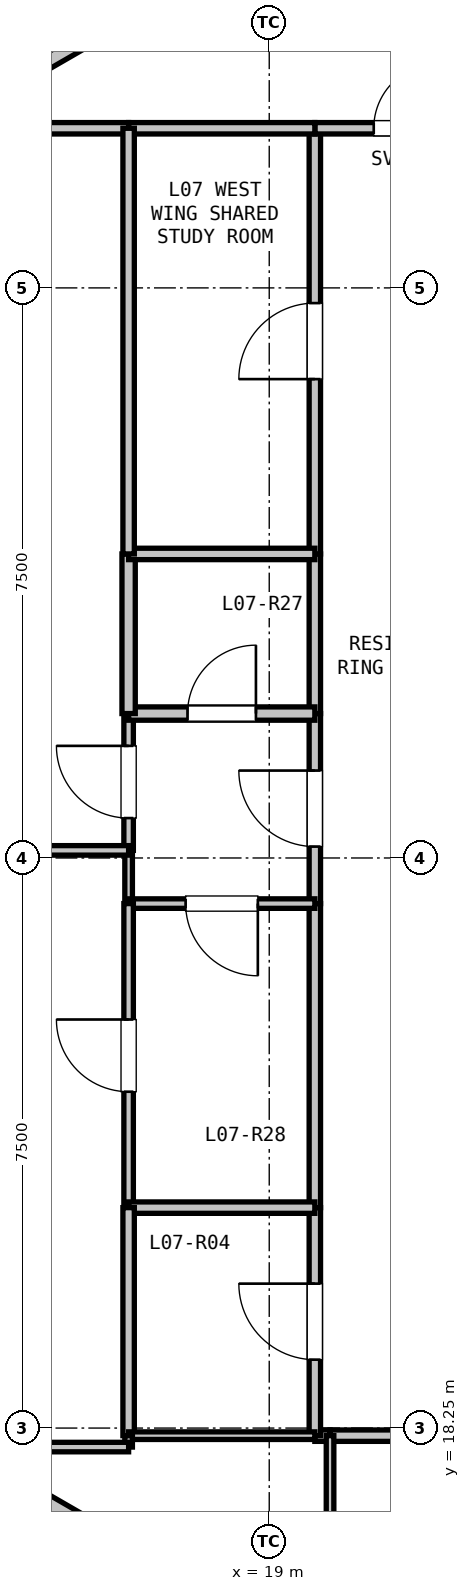
"""IFC4 building model, lengths in metres.
Left out: names, types, materials, properties, quantities, classifications, styles, units other than length and angle.
Written with IfcOpenShell. Run it as: python <this file> out.ifc"""

import sys

from ifc_helpers import new_model, si_unit, direction, frame, frame_2d, origin, place, context, subcontext, project, spatial, rectangle, extrude, element, fill, save


model = new_model("IFC4")
c1 = context("Model", 3, precision=1e-05, world=origin(), true_north=direction((0.0, 1.0)))
c2 = subcontext(c1, "Body", "Model", "MODEL_VIEW")
j1 = project(units=[si_unit("LENGTHUNIT", "METRE"), si_unit("PLANEANGLEUNIT", "RADIAN")], contexts=[c1])
p1 = place(None, origin())
s1 = spatial("IfcSite", under=j1, at=p1, CompositionType="ELEMENT")
p2 = place(p1, origin())
s2 = spatial("IfcBuilding", under=s1, at=p2, CompositionType="ELEMENT")
p3 = place(p2, frame((0.0, 0.0, 29.1)))
s3 = spatial("IfcBuildingStorey", under=s2, at=p3, CompositionType="ELEMENT", Elevation=29.1)
for number, where, z_axis, x_axis in (
    (1, (15.008, 35.611, 0.0), (0.0, 0.0, 1.0), (0.866, 0.5, 0.0)),
    (2, (16.48, 17.039, 0.0), (0.0, 0.0, 1.0), (-0.866, 0.5, 0.0)),
):
    element("IfcWall", number, at=place(p3, frame(where, z_axis=z_axis, x_axis=x_axis)), inside=s3, PredefinedType="PARAPET", context=c2, shape_type="SweptSolid", body=[
        extrude(rectangle(XDim=1.7, YDim=0.2, at=frame_2d((0.85, 0.0))), origin(), (0.0, 0.0, 1.0), 2.66),
    ])
p4 = place(p3, frame((22.6, 18.15, 0.0), z_axis=(0.0, 0.0, 1.0), x_axis=(-1.0, 0.0, 0.0)))
e3 = element("IfcWall", 3, at=p4, inside=s3, PredefinedType="PARTITIONING", context=c2, shape_type="SweptSolid", body=[
    extrude(rectangle(XDim=2.8, YDim=0.15, at=frame_2d((1.4, 0.0))), origin(), (0.0, 0.0, 1.0), 3.04),
])
p5 = place(p4, frame((0.9, 0.0, 0.0)))
e4 = element("IfcOpeningElement", 4, at=p5, cuts=e3, PredefinedType="OPENING", context=c2, shape_type="SweptSolid", body=[
    extrude(rectangle(XDim=1.0, YDim=2.15, at=frame_2d((0.5, 1.075))), frame((0.0, 0.085, 0.0), z_axis=(0.0, -1.0, 0.0), x_axis=(1.0, 0.0, 0.0)), (0.0, 0.0, 1.0), 0.17),
])
p6 = place(p3, frame((19.8, 18.15, 0.0), z_axis=(0.0, 0.0, 1.0), x_axis=(-1.0, 0.0, 0.0)))
e5 = element("IfcWall", 5, at=p6, inside=s3, PredefinedType="PARTITIONING", context=c2, shape_type="SweptSolid", body=[
    extrude(rectangle(XDim=0.2, YDim=0.15, at=frame_2d((0.1, 0.0))), origin(), (0.0, 0.0, 1.0), 3.04),
])
p7 = place(p3, frame((19.6, 18.15, 0.0), z_axis=(0.0, 0.0, 1.0), x_axis=(0.0, 1.0, 0.0)))
e6 = element("IfcWall", 6, at=p7, inside=s3, PredefinedType="PARTITIONING", context=c2, shape_type="SweptSolid", body=[
    extrude(rectangle(XDim=3.0, YDim=0.15, at=frame_2d((1.5, 0.0))), origin(), (0.0, 0.0, 1.0), 2.337),
])
p8 = place(p7, frame((1.0, 0.0, 0.0)))
e7 = element("IfcOpeningElement", 7, at=p8, cuts=e6, PredefinedType="OPENING", context=c2, shape_type="SweptSolid", body=[
    extrude(rectangle(XDim=1.0, YDim=2.15, at=frame_2d((0.5, 1.075))), frame((0.0, 0.085, 0.0), z_axis=(0.0, -1.0, 0.0), x_axis=(1.0, 0.0, 0.0)), (0.0, 0.0, 1.0), 0.17),
])
p9 = place(p3, frame((19.6, 21.15, 0.0), z_axis=(0.0, 0.0, 1.0), x_axis=(0.0, 1.0, 0.0)))
e8 = element("IfcWall", 8, at=p9, inside=s3, PredefinedType="PARTITIONING", context=c2, shape_type="SweptSolid", body=[
    extrude(rectangle(XDim=4.0, YDim=0.15, at=frame_2d((2.0, 0.0))), origin(), (0.0, 0.0, 1.0), 3.04),
])
p10 = place(p3, frame((19.6, 25.15, 0.0), z_axis=(0.0, 0.0, 1.0), x_axis=(0.0, 1.0, 0.0)))
e9 = element("IfcWall", 9, at=p10, inside=s3, PredefinedType="PARTITIONING", context=c2, shape_type="SweptSolid", body=[
    extrude(rectangle(XDim=2.5, YDim=0.15, at=frame_2d((1.25, 0.0))), origin(), (0.0, 0.0, 1.0), 3.04),
])
p11 = place(p10, frame((0.75, 0.0, 0.0)))
e10 = element("IfcOpeningElement", 10, at=p11, cuts=e9, PredefinedType="OPENING", context=c2, shape_type="SweptSolid", body=[
    extrude(rectangle(XDim=1.0, YDim=2.15, at=frame_2d((0.5, 1.075))), frame((0.0, 0.085, 0.0), z_axis=(0.0, -1.0, 0.0), x_axis=(1.0, 0.0, 0.0)), (0.0, 0.0, 1.0), 0.17),
])
p12 = place(p3, frame((19.6, 27.65, 0.0), z_axis=(0.0, 0.0, 1.0), x_axis=(0.0, 1.0, 0.0)))
e11 = element("IfcWall", 11, at=p12, inside=s3, PredefinedType="PARTITIONING", context=c2, shape_type="SweptSolid", body=[
    extrude(rectangle(XDim=2.1, YDim=0.15, at=frame_2d((1.05, 0.0))), origin(), (0.0, 0.0, 1.0), 3.04),
])
p13 = place(p3, frame((19.6, 29.75, 0.0), z_axis=(0.0, 0.0, 1.0), x_axis=(0.0, 1.0, 0.0)))
e12 = element("IfcWall", 12, at=p13, inside=s3, PredefinedType="PARTITIONING", context=c2, shape_type="SweptSolid", body=[
    extrude(rectangle(XDim=5.6, YDim=0.15, at=frame_2d((2.8, 0.0))), origin(), (0.0, 0.0, 1.0), 2.337),
])
p14 = place(p13, frame((2.3, 0.0, 0.0)))
e13 = element("IfcOpeningElement", 13, at=p14, cuts=e12, PredefinedType="OPENING", context=c2, shape_type="SweptSolid", body=[
    extrude(rectangle(XDim=1.0, YDim=2.15, at=frame_2d((0.5, 1.075))), frame((0.0, 0.085, 0.0), z_axis=(0.0, -1.0, 0.0), x_axis=(1.0, 0.0, 0.0)), (0.0, 0.0, 1.0), 0.17),
])
p15 = place(p3, frame((19.6, 35.35, 0.0), z_axis=(0.0, 0.0, 1.0), x_axis=(1.0, 0.0, 0.0)))
e14 = element("IfcWall", 14, at=p15, inside=s3, PredefinedType="PARTITIONING", context=c2, shape_type="SweptSolid", body=[
    extrude(rectangle(XDim=2.4, YDim=0.15, at=frame_2d((1.2, 0.0))), origin(), (0.0, 0.0, 1.0), 3.04),
])
p16 = place(p15, frame((0.775, 0.0, 0.0)))
e15 = element("IfcOpeningElement", 15, at=p16, cuts=e14, PredefinedType="OPENING", context=c2, shape_type="SweptSolid", body=[
    extrude(rectangle(XDim=0.85, YDim=2.1, at=frame_2d((0.425, 1.05))), frame((0.0, 0.085, 0.0), z_axis=(0.0, -1.0, 0.0), x_axis=(1.0, 0.0, 0.0)), (0.0, 0.0, 1.0), 0.17),
])
p17 = place(p3, frame((17.15, 25.15, 0.0), z_axis=(0.0, 0.0, 1.0), x_axis=(0.0, 1.0, 0.0)))
e16 = element("IfcWall", 16, at=p17, inside=s3, PredefinedType="PARTITIONING", context=c2, shape_type="SweptSolid", body=[
    extrude(rectangle(XDim=0.7, YDim=0.1, at=frame_2d((0.35, 0.0))), origin(), (0.0, 0.0, 1.0), 3.04),
])
p18 = place(p3, frame((17.15, 25.85, 0.0), z_axis=(0.0, 0.0, 1.0), x_axis=(0.0, 1.0, 0.0)))
e17 = element("IfcWall", 17, at=p18, inside=s3, PredefinedType="PARTITIONING", context=c2, shape_type="SweptSolid", body=[
    extrude(rectangle(XDim=1.8, YDim=0.125, at=frame_2d((0.9, 0.0))), origin(), (0.0, 0.0, 1.0), 3.04),
])
p19 = place(p18, frame((0.425, 0.0, 0.0)))
e18 = element("IfcOpeningElement", 18, at=p19, cuts=e17, PredefinedType="OPENING", context=c2, shape_type="SweptSolid", body=[
    extrude(rectangle(XDim=0.95, YDim=2.1, at=frame_2d((0.475, 1.05))), frame((0.0, 0.073, 0.0), z_axis=(0.0, -1.0, 0.0), x_axis=(1.0, 0.0, 0.0)), (0.0, 0.0, 1.0), 0.145),
])
p20 = place(p3, frame((17.15, 27.65, 0.0), z_axis=(0.0, 0.0, 1.0), x_axis=(1.0, 0.0, 0.0)))
e19 = element("IfcWall", 19, at=p20, inside=s3, PredefinedType="PLUMBINGWALL", context=c2, shape_type="SweptSolid", body=[
    extrude(rectangle(XDim=2.45, YDim=0.175, at=frame_2d((1.225, 0.0))), origin(), (0.0, 0.0, 1.0), 3.04),
])
p21 = place(p20, frame((0.775, 0.0, 0.0)))
e20 = element("IfcOpeningElement", 20, at=p21, cuts=e19, PredefinedType="OPENING", context=c2, shape_type="SweptSolid", body=[
    extrude(rectangle(XDim=0.9, YDim=2.1, at=frame_2d((0.45, 1.05))), frame((0.0, 0.097, 0.0), z_axis=(0.0, -1.0, 0.0), x_axis=(1.0, 0.0, 0.0)), (0.0, 0.0, 1.0), 0.195),
])
p22 = place(p3, frame((19.6, 25.15, 0.0), z_axis=(0.0, 0.0, 1.0), x_axis=(-1.0, 0.0, 0.0)))
e21 = element("IfcWall", 21, at=p22, inside=s3, PredefinedType="PARTITIONING", context=c2, shape_type="SweptSolid", body=[
    extrude(rectangle(XDim=2.45, YDim=0.125, at=frame_2d((1.225, 0.0))), origin(), (0.0, 0.0, 1.0), 3.04),
])
p23 = place(p22, frame((0.75, 0.0, 0.0)))
e22 = element("IfcOpeningElement", 22, at=p23, cuts=e21, PredefinedType="OPENING", context=c2, shape_type="SweptSolid", body=[
    extrude(rectangle(XDim=0.95, YDim=2.1, at=frame_2d((0.475, 1.05))), frame((0.0, 0.073, 0.0), z_axis=(0.0, -1.0, 0.0), x_axis=(1.0, 0.0, 0.0)), (0.0, 0.0, 1.0), 0.145),
])
p24 = place(p3, frame((17.15, 27.65, 0.0), z_axis=(0.0, 0.0, 1.0), x_axis=(0.0, 1.0, 0.0)))
e23 = element("IfcWall", 23, at=p24, inside=s3, PredefinedType="PLUMBINGWALL", context=c2, shape_type="SweptSolid", body=[
    extrude(rectangle(XDim=2.1, YDim=0.175, at=frame_2d((1.05, 0.0))), origin(), (0.0, 0.0, 1.0), 3.04),
])
p25 = place(p3, frame((17.15, 29.75, 0.0), z_axis=(0.0, 0.0, 1.0), x_axis=(1.0, 0.0, 0.0)))
e24 = element("IfcWall", 24, at=p25, inside=s3, PredefinedType="PARTITIONING", context=c2, shape_type="SweptSolid", body=[
    extrude(rectangle(XDim=2.45, YDim=0.15, at=frame_2d((1.225, 0.0))), origin(), (0.0, 0.0, 1.0), 3.04),
])
p26 = place(p3, frame((17.15, 21.15, 0.0), z_axis=(0.0, 0.0, 1.0), x_axis=(0.0, 1.0, 0.0)))
e25 = element("IfcWall", 25, at=p26, inside=s3, PredefinedType="PARTITIONING", context=c2, shape_type="SweptSolid", body=[
    extrude(rectangle(XDim=4.0, YDim=0.125, at=frame_2d((2.0, 0.0))), origin(), (0.0, 0.0, 1.0), 2.337),
])
p27 = place(p26, frame((1.525, 0.0, 0.0)))
e26 = element("IfcOpeningElement", 26, at=p27, cuts=e25, PredefinedType="OPENING", context=c2, shape_type="SweptSolid", body=[
    extrude(rectangle(XDim=0.95, YDim=2.1, at=frame_2d((0.475, 1.05))), frame((0.0, 0.073, 0.0), z_axis=(0.0, -1.0, 0.0), x_axis=(1.0, 0.0, 0.0)), (0.0, 0.0, 1.0), 0.145),
])
p28 = place(p3, frame((19.6, 21.15, 0.0), z_axis=(0.0, 0.0, 1.0), x_axis=(-1.0, 0.0, 0.0)))
e27 = element("IfcWall", 27, at=p28, inside=s3, PredefinedType="PARTITIONING", context=c2, shape_type="SweptSolid", body=[
    extrude(rectangle(XDim=2.45, YDim=0.15, at=frame_2d((1.225, 0.0))), origin(), (0.0, 0.0, 1.0), 2.337),
])
p29 = place(p3, frame((19.6, 35.35, 0.0), z_axis=(0.0, 0.0, 1.0), x_axis=(-1.0, 0.0, 0.0)))
e28 = element("IfcWall", 28, at=p29, inside=s3, PredefinedType="PARTITIONING", context=c2, shape_type="SweptSolid", body=[
    extrude(rectangle(XDim=2.45, YDim=0.15, at=frame_2d((1.225, 0.0))), origin(), (0.0, 0.0, 1.0), 3.04),
])
p30 = place(p3, frame((17.15, 35.35, 0.0), z_axis=(0.0, 0.0, 1.0), x_axis=(-1.0, 0.0, 0.0)))
e29 = element("IfcWall", 29, at=p30, inside=s3, PredefinedType="PARTITIONING", context=c2, shape_type="SweptSolid", body=[
    extrude(rectangle(XDim=1.15, YDim=0.15, at=frame_2d((0.575, 0.0))), origin(), (0.0, 0.0, 1.0), 3.04),
])
p31 = place(p3, frame((17.15, 29.75, 0.0), z_axis=(0.0, 0.0, 1.0), x_axis=(0.0, 1.0, 0.0)))
e30 = element("IfcWall", 30, at=p31, inside=s3, PredefinedType="PARTITIONING", context=c2, shape_type="SweptSolid", body=[
    extrude(rectangle(XDim=5.6, YDim=0.15, at=frame_2d((2.8, 0.0))), origin(), (0.0, 0.0, 1.0), 2.337),
])
p32 = place(p3, frame((17.15, 18.15, 0.0), z_axis=(0.0, 0.0, 1.0), x_axis=(0.0, 1.0, 0.0)))
e31 = element("IfcWall", 31, at=p32, inside=s3, PredefinedType="PARTITIONING", context=c2, shape_type="SweptSolid", body=[
    extrude(rectangle(XDim=3.0, YDim=0.15, at=frame_2d((1.5, 0.0))), origin(), (0.0, 0.0, 1.0), 3.04),
])
p33 = place(p3, frame((19.6, 18.15, 0.0), z_axis=(0.0, 0.0, 1.0), x_axis=(-1.0, 0.0, 0.0)))
e32 = element("IfcWall", 32, at=p33, inside=s3, PredefinedType="PARTITIONING", context=c2, shape_type="SweptSolid", body=[
    extrude(rectangle(XDim=2.45, YDim=0.1, at=frame_2d((1.225, 0.0))), origin(), (0.0, 0.0, 1.0), 3.04),
])
p34 = place(p3, frame((19.8, 14.956, 0.0), z_axis=(0.0, 0.0, 1.0), x_axis=(0.0, 1.0, 0.0)))
e33 = element("IfcWall", 33, at=p34, inside=s3, PredefinedType="PARTITIONING", context=c2, shape_type="SweptSolid", body=[
    extrude(rectangle(XDim=3.194, YDim=0.1, at=frame_2d((1.597, 0.0))), origin(), (0.0, 0.0, 1.0), 2.365),
])
p35 = place(p3, frame((17.15, 25.85, 0.0), z_axis=(0.0, 0.0, 1.0), x_axis=(-1.0, 0.0, 0.0)))
e34 = element("IfcWall", 34, at=p35, inside=s3, PredefinedType="PARTITIONING", context=c2, shape_type="SweptSolid", body=[
    extrude(rectangle(XDim=6.67, YDim=0.125, at=frame_2d((3.335, 0.0))), origin(), (0.0, 0.0, 1.0), 3.04),
])
p36 = place(p35, frame((2.86, 0.0, 0.0)))
e35 = element("IfcOpeningElement", 35, at=p36, cuts=e34, PredefinedType="OPENING", context=c2, shape_type="SweptSolid", body=[
    extrude(rectangle(XDim=0.95, YDim=2.1, at=frame_2d((0.475, 1.05))), frame((0.0, 0.073, 0.0), z_axis=(0.0, -1.0, 0.0), x_axis=(1.0, 0.0, 0.0)), (0.0, 0.0, 1.0), 0.145),
])
p37 = place(p3, frame((17.15, 18.15, 0.0), z_axis=(0.0, 0.0, 1.0), x_axis=(0.0, -1.0, 0.0)))
e36 = element("IfcWall", 36, at=p37, inside=s3, PredefinedType="PARTITIONING", context=c2, shape_type="SweptSolid", body=[
    extrude(rectangle(XDim=0.15, YDim=0.1, at=frame_2d((0.075, 0.0))), origin(), (0.0, 0.0, 1.0), 3.04),
])
p38 = place(p3, frame((17.15, 18.0, 0.0), z_axis=(0.0, 0.0, 1.0), x_axis=(-1.0, 0.0, 0.0)))
e37 = element("IfcWall", 37, at=p38, inside=s3, PredefinedType="PARTITIONING", context=c2, shape_type="SweptSolid", body=[
    extrude(rectangle(XDim=2.401, YDim=0.125, at=frame_2d((1.2, 0.0))), origin(), (0.0, 0.0, 1.0), 2.365),
])
p39 = place(p11, origin())
e38 = element("IfcDoor", 38, at=p39, inside=s3, OperationType="SINGLE_SWING_RIGHT", PredefinedType="DOOR", context=c2, shape_type="SweptSolid", body=[
    extrude(rectangle(XDim=1.0, YDim=2.15, at=frame_2d((0.5, 1.075))), frame((0.0, 0.025, 0.0), z_axis=(0.0, -1.0, 0.0), x_axis=(1.0, 0.0, 0.0)), (0.0, 0.0, 1.0), 0.05),
])
fill(e10, e38)
p40 = place(p16, origin())
e39 = element("IfcDoor", 39, at=p40, inside=s3, OperationType="SINGLE_SWING_RIGHT", PredefinedType="DOOR", context=c2, shape_type="SweptSolid", body=[
    extrude(rectangle(XDim=0.85, YDim=2.1, at=frame_2d((0.425, 1.05))), frame((0.0, 0.025, 0.0), z_axis=(0.0, -1.0, 0.0), x_axis=(1.0, 0.0, 0.0)), (0.0, 0.0, 1.0), 0.05),
])
fill(e15, e39)
p41 = place(p14, origin())
e40 = element("IfcDoor", 40, at=p41, inside=s3, OperationType="SINGLE_SWING_LEFT", PredefinedType="DOOR", context=c2, shape_type="SweptSolid", body=[
    extrude(rectangle(XDim=1.0, YDim=2.15, at=frame_2d((0.5, 1.075))), frame((0.0, 0.025, 0.0), z_axis=(0.0, -1.0, 0.0), x_axis=(1.0, 0.0, 0.0)), (0.0, 0.0, 1.0), 0.05),
])
fill(e13, e40)
p42 = place(p8, origin())
e41 = element("IfcDoor", 41, at=p42, inside=s3, OperationType="SINGLE_SWING_RIGHT", PredefinedType="DOOR", context=c2, shape_type="SweptSolid", body=[
    extrude(rectangle(XDim=1.0, YDim=2.15, at=frame_2d((0.5, 1.075))), frame((0.0, 0.025, 0.0), z_axis=(0.0, -1.0, 0.0), x_axis=(1.0, 0.0, 0.0)), (0.0, 0.0, 1.0), 0.05),
])
fill(e7, e41)
p43 = place(p21, origin())
e42 = element("IfcDoor", 42, at=p43, inside=s3, OperationType="SINGLE_SWING_RIGHT", PredefinedType="DOOR", context=c2, shape_type="SweptSolid", body=[
    extrude(rectangle(XDim=0.9, YDim=2.1, at=frame_2d((0.45, 1.05))), frame((0.0, 0.025, 0.0), z_axis=(0.0, -1.0, 0.0), x_axis=(1.0, 0.0, 0.0)), (0.0, 0.0, 1.0), 0.05),
])
fill(e20, e42)
p44 = place(p23, origin())
e43 = element("IfcDoor", 43, at=p44, inside=s3, OperationType="SINGLE_SWING_LEFT", PredefinedType="DOOR", context=c2, shape_type="SweptSolid", body=[
    extrude(rectangle(XDim=0.95, YDim=2.1, at=frame_2d((0.475, 1.05))), frame((0.0, 0.025, 0.0), z_axis=(0.0, -1.0, 0.0), x_axis=(1.0, 0.0, 0.0)), (0.0, 0.0, 1.0), 0.05),
])
fill(e22, e43)
p45 = place(p19, origin())
e44 = element("IfcDoor", 44, at=p45, inside=s3, OperationType="SINGLE_SWING_RIGHT", PredefinedType="DOOR", context=c2, shape_type="SweptSolid", body=[
    extrude(rectangle(XDim=0.95, YDim=2.1, at=frame_2d((0.475, 1.05))), frame((0.0, 0.025, 0.0), z_axis=(0.0, -1.0, 0.0), x_axis=(1.0, 0.0, 0.0)), (0.0, 0.0, 1.0), 0.05),
])
fill(e18, e44)
p46 = place(p27, origin())
e45 = element("IfcDoor", 45, at=p46, inside=s3, OperationType="SINGLE_SWING_RIGHT", PredefinedType="DOOR", context=c2, shape_type="SweptSolid", body=[
    extrude(rectangle(XDim=0.95, YDim=2.1, at=frame_2d((0.475, 1.05))), frame((0.0, 0.025, 0.0), z_axis=(0.0, -1.0, 0.0), x_axis=(1.0, 0.0, 0.0)), (0.0, 0.0, 1.0), 0.05),
])
fill(e26, e45)
save(model, sys.argv[1])
